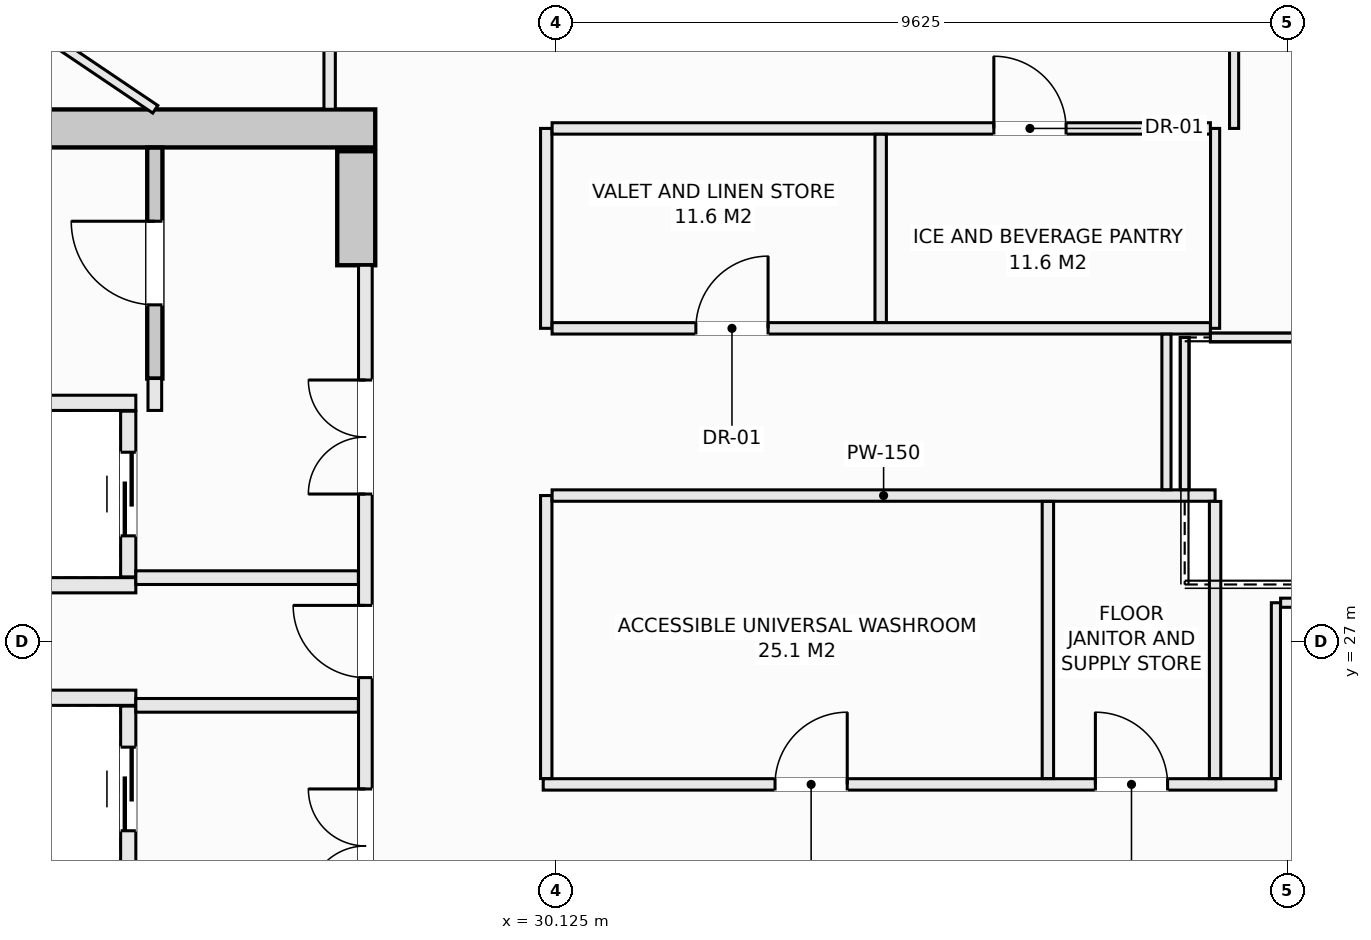
"""IFC4 building model, lengths in metres.
Left out: names, types, materials, properties, quantities, classifications, styles, units other than length and angle.
Written with IfcOpenShell. Run it as: python <this file> out.ifc"""

import sys

from ifc_helpers import new_model, si_unit, direction, frame, frame_2d, origin, place, context, subcontext, project, spatial, rectangle, extrude, element, fill, save


model = new_model("IFC4")
c1 = context("Model", 3, precision=1e-05, world=origin(), true_north=direction((0.0, 1.0)))
c2 = subcontext(c1, "Body", "Model", "MODEL_VIEW")
j1 = project(units=[si_unit("LENGTHUNIT", "METRE"), si_unit("PLANEANGLEUNIT", "RADIAN")], contexts=[c1])
p1 = place(None, origin())
s1 = spatial("IfcSite", under=j1, at=p1, CompositionType="ELEMENT")
p2 = place(p1, origin())
s2 = spatial("IfcBuilding", under=s1, at=p2, CompositionType="ELEMENT")
p3 = place(p2, frame((0.0, 0.0, 199.7)))
s3 = spatial("IfcBuildingStorey", under=s2, at=p3, CompositionType="ELEMENT", Elevation=199.7)
p4 = place(p3, frame((14.25, 33.75, -0.27), z_axis=(0.0, 0.0, 1.0), x_axis=(1.0, 0.0, 0.0)))
e1 = element("IfcWall", 1, at=p4, inside=s3, PredefinedType="SHEAR", context=c2, shape_type="SweptSolid", body=[
    extrude(rectangle(XDim=13.5, YDim=0.5, at=frame_2d((6.75, 0.0))), origin(), (0.0, 0.0, 1.0), 3.3),
])
p5 = place(p3, frame((27.5, 31.95, -0.27), z_axis=(0.0, 0.0, 1.0), x_axis=(0.0, 1.0, 0.0)))
e2 = element("IfcWall", 2, at=p5, inside=s3, PredefinedType="SHEAR", context=c2, shape_type="SweptSolid", body=[
    extrude(rectangle(XDim=1.5, YDim=0.5, at=frame_2d((0.75, 0.0))), origin(), (0.0, 0.0, 1.0), 3.3),
])
p6 = place(p3, frame((24.85, 30.46, -0.27), z_axis=(0.0, 0.0, 1.0), x_axis=(0.0, 1.0, 0.0)))
e3 = element("IfcWall", 3, at=p6, inside=s3, PredefinedType="SHEAR", context=c2, shape_type="SweptSolid", body=[
    extrude(rectangle(XDim=3.038, YDim=0.2, at=frame_2d((1.519, 0.0))), origin(), (0.0, 0.0, 1.0), 3.3),
])
p7 = place(p6, frame((0.969, 0.0, 0.27)))
e4 = element("IfcOpeningElement", 4, at=p7, cuts=e3, PredefinedType="OPENING", context=c2, shape_type="SweptSolid", body=[
    extrude(rectangle(XDim=1.1, YDim=2.15, at=frame_2d((0.55, 1.075))), frame((0.0, 0.11, 0.0), z_axis=(0.0, -1.0, 0.0), x_axis=(1.0, 0.0, 0.0)), (0.0, 0.0, 1.0), 0.22),
])
for number, where, z_axis, x_axis in (
    (5, (22.15, 30.14, 0.0), (0.0, 0.0, 1.0), (1.0, 0.0, 0.0)),
    (6, (22.15, 27.74, 0.0), (0.0, 0.0, 1.0), (1.0, 0.0, 0.0)),
):
    element("IfcWall", number, at=place(p3, frame(where, z_axis=z_axis, x_axis=x_axis)), inside=s3, PredefinedType="SOLIDWALL", context=c2, shape_type="SweptSolid", body=[
        extrude(rectangle(XDim=2.45, YDim=0.2, at=frame_2d((1.225, 0.0))), origin(), (0.0, 0.0, 1.0), 3.03),
    ])
p8 = place(p3, frame((24.5, 27.85, 0.0), z_axis=(0.0, 0.0, 1.0), x_axis=(0.0, 1.0, 0.0)))
e7 = element("IfcWall", 7, at=p8, inside=s3, PredefinedType="SOLIDWALL", context=c2, shape_type="SweptSolid", body=[
    extrude(rectangle(XDim=2.18, YDim=0.2, at=frame_2d((1.09, 0.0))), origin(), (0.0, 0.0, 1.0), 3.03),
])
p9 = place(p8, frame((0.54, 0.0, 0.0)))
e8 = element("IfcOpeningElement", 8, at=p9, cuts=e7, PredefinedType="OPENING", context=c2, shape_type="SweptSolid", body=[
    extrude(rectangle(XDim=1.1, YDim=2.2, at=frame_2d((0.55, 1.1))), frame((0.0, 0.11, 0.0), z_axis=(0.0, -1.0, 0.0), x_axis=(1.0, 0.0, 0.0)), (0.0, 0.0, 1.0), 0.22),
])
p10 = place(p3, frame((22.15, 26.26, 0.0), z_axis=(0.0, 0.0, 1.0), x_axis=(1.0, 0.0, 0.0)))
e9 = element("IfcWall", 9, at=p10, inside=s3, PredefinedType="SOLIDWALL", context=c2, shape_type="SweptSolid", body=[
    extrude(rectangle(XDim=2.45, YDim=0.2, at=frame_2d((1.225, 0.0))), origin(), (0.0, 0.0, 1.0), 3.03),
])
p11 = place(p3, frame((24.5, 23.97, 0.0), z_axis=(0.0, 0.0, 1.0), x_axis=(0.0, 1.0, 0.0)))
e10 = element("IfcWall", 10, at=p11, inside=s3, PredefinedType="SOLIDWALL", context=c2, shape_type="SweptSolid", body=[
    extrude(rectangle(XDim=2.18, YDim=0.2, at=frame_2d((1.09, 0.0))), origin(), (0.0, 0.0, 1.0), 3.03),
])
p12 = place(p11, frame((0.54, 0.0, 0.0)))
e11 = element("IfcOpeningElement", 11, at=p12, cuts=e10, PredefinedType="OPENING", context=c2, shape_type="SweptSolid", body=[
    extrude(rectangle(XDim=1.1, YDim=2.2, at=frame_2d((0.55, 1.1))), frame((0.0, 0.11, 0.0), z_axis=(0.0, -1.0, 0.0), x_axis=(1.0, 0.0, 0.0)), (0.0, 0.0, 1.0), 0.22),
])
p13 = place(p3, frame((24.85, 30.04, 0.0), z_axis=(0.0, 0.0, 1.0), x_axis=(0.0, 1.0, 0.0)))
e12 = element("IfcWall", 12, at=p13, inside=s3, PredefinedType="SOLIDWALL", context=c2, shape_type="SweptSolid", body=[
    extrude(rectangle(XDim=0.42, YDim=0.18, at=frame_2d((0.21, 0.0))), origin(), (0.0, 0.0, 1.0), 3.03),
])
p14 = place(p3, frame((27.62, 22.05, 0.0), z_axis=(0.0, 0.0, 1.0), x_axis=(0.0, 1.0, 0.0)))
e13 = element("IfcWall", 13, at=p14, inside=s3, PredefinedType="SOLIDWALL", context=c2, shape_type="SweptSolid", body=[
    extrude(rectangle(XDim=9.9, YDim=0.18, at=frame_2d((4.95, 0.0))), origin(), (0.0, 0.0, 1.0), 3.03),
])
p15 = place(p14, frame((4.475, 0.0, 0.0)))
e14 = element("IfcOpeningElement", 14, at=p15, cuts=e13, PredefinedType="OPENING", context=c2, shape_type="SweptSolid", body=[
    extrude(rectangle(XDim=0.95, YDim=2.1, at=frame_2d((0.475, 1.05))), frame((0.0, 0.1, 0.0), z_axis=(0.0, -1.0, 0.0), x_axis=(1.0, 0.0, 0.0)), (0.0, 0.0, 1.0), 0.2),
])
p16 = place(p14, frame((6.89, 0.0, 0.0)))
e15 = element("IfcOpeningElement", 15, at=p16, cuts=e13, PredefinedType="OPENING", context=c2, shape_type="SweptSolid", body=[
    extrude(rectangle(XDim=1.5, YDim=2.2, at=frame_2d((0.75, 1.1))), frame((0.0, 0.1, 0.0), z_axis=(0.0, -1.0, 0.0), x_axis=(1.0, 0.0, 0.0)), (0.0, 0.0, 1.0), 0.2),
])
p17 = place(p14, frame((1.51, 0.0, 0.0)))
e16 = element("IfcOpeningElement", 16, at=p17, cuts=e13, PredefinedType="OPENING", context=c2, shape_type="SweptSolid", body=[
    extrude(rectangle(XDim=1.5, YDim=2.2, at=frame_2d((0.75, 1.1))), frame((0.0, 0.1, 0.0), z_axis=(0.0, -1.0, 0.0), x_axis=(1.0, 0.0, 0.0)), (0.0, 0.0, 1.0), 0.2),
])
for number, where, z_axis, x_axis in (
    (17, (24.6, 27.84, 0.0), (0.0, 0.0, 1.0), (1.0, 0.0, 0.0)),
    (18, (24.6, 26.16, 0.0), (0.0, 0.0, 1.0), (1.0, 0.0, 0.0)),
):
    element("IfcWall", number, at=place(p3, frame(where, z_axis=z_axis, x_axis=x_axis)), inside=s3, PredefinedType="SOLIDWALL", context=c2, shape_type="SweptSolid", body=[
        extrude(rectangle(XDim=2.928, YDim=0.18, at=frame_2d((1.464, 0.0))), origin(), (0.0, 0.0, 1.0), 3.03),
    ])
p18 = place(p3, frame((27.15, 34.002, 0.0), z_axis=(0.0, 0.0, 1.0), x_axis=(0.0, 1.0, 0.0)))
e19 = element("IfcWall", 19, at=p18, inside=s3, PredefinedType="PARTITIONING", context=c2, shape_type="SweptSolid", body=[
    extrude(rectangle(XDim=4.198, YDim=0.15, at=frame_2d((2.099, 0.0))), origin(), (0.0, 0.0, 1.0), 3.03),
])
p19 = place(p18, frame((1.998, 0.0, 0.0)))
e20 = element("IfcOpeningElement", 20, at=p19, cuts=e19, PredefinedType="OPENING", context=c2, shape_type="SweptSolid", body=[
    extrude(rectangle(XDim=0.95, YDim=2.1, at=frame_2d((0.475, 1.05))), frame((0.0, 0.085, 0.0), z_axis=(0.0, -1.0, 0.0), x_axis=(1.0, 0.0, 0.0)), (0.0, 0.0, 1.0), 0.17),
])
p20 = place(p3, frame((29.96, 25.12, 0.0), z_axis=(0.0, 0.0, 1.0), x_axis=(1.0, 0.0, 0.0)))
e21 = element("IfcWall", 21, at=p20, inside=s3, PredefinedType="PARTITIONING", context=c2, shape_type="SweptSolid", body=[
    extrude(rectangle(XDim=9.64, YDim=0.15, at=frame_2d((4.82, 0.0))), origin(), (0.0, 0.0, 1.0), 3.03),
])
p21 = place(p20, frame((3.05, 0.0, 0.0)))
e22 = element("IfcOpeningElement", 22, at=p21, cuts=e21, PredefinedType="OPENING", context=c2, shape_type="SweptSolid", body=[
    extrude(rectangle(XDim=0.95, YDim=2.1, at=frame_2d((0.475, 1.05))), frame((0.0, 0.085, 0.0), z_axis=(0.0, -1.0, 0.0), x_axis=(1.0, 0.0, 0.0)), (0.0, 0.0, 1.0), 0.17),
])
p22 = place(p20, frame((7.265, 0.0, 0.0)))
e23 = element("IfcOpeningElement", 23, at=p22, cuts=e21, PredefinedType="OPENING", context=c2, shape_type="SweptSolid", body=[
    extrude(rectangle(XDim=0.95, YDim=2.1, at=frame_2d((0.475, 1.05))), frame((0.0, 0.085, 0.0), z_axis=(0.0, -1.0, 0.0), x_axis=(1.0, 0.0, 0.0)), (0.0, 0.0, 1.0), 0.17),
])
p23 = place(p3, frame((30.0, 25.197, 0.0), z_axis=(0.0, 0.0, 1.0), x_axis=(0.0, 1.0, 0.0)))
e24 = element("IfcWall", 24, at=p23, inside=s3, PredefinedType="PARTITIONING", context=c2, shape_type="SweptSolid", body=[
    extrude(rectangle(XDim=3.723, YDim=0.15, at=frame_2d((1.861, 0.0))), origin(), (0.0, 0.0, 1.0), 3.03),
])
p24 = place(p3, frame((30.0, 31.12, 0.0), z_axis=(0.0, 0.0, 1.0), x_axis=(0.0, 1.0, 0.0)))
e25 = element("IfcWall", 25, at=p24, inside=s3, PredefinedType="PARTITIONING", context=c2, shape_type="SweptSolid", body=[
    extrude(rectangle(XDim=2.63, YDim=0.15, at=frame_2d((1.315, 0.0))), origin(), (0.0, 0.0, 1.0), 3.03),
])
p25 = place(p3, frame((30.077, 28.92, 0.0), z_axis=(0.0, 0.0, 1.0), x_axis=(1.0, 0.0, 0.0)))
e26 = element("IfcWall", 26, at=p25, inside=s3, PredefinedType="PARTITIONING", context=c2, shape_type="SweptSolid", body=[
    extrude(rectangle(XDim=8.723, YDim=0.15, at=frame_2d((4.362, 0.0))), origin(), (0.0, 0.0, 1.0), 3.03),
])
for number, where, z_axis, x_axis in (
    (27, (36.6, 25.197, 0.0), (0.0, 0.0, 1.0), (0.0, 1.0, 0.0)),
    (28, (38.8, 25.197, 0.0), (0.0, 0.0, 1.0), (0.0, 1.0, 0.0)),
):
    element("IfcWall", number, at=place(p3, frame(where, z_axis=z_axis, x_axis=x_axis)), inside=s3, PredefinedType="PARTITIONING", context=c2, shape_type="SweptSolid", body=[
        extrude(rectangle(XDim=3.646, YDim=0.15, at=frame_2d((1.823, 0.0))), origin(), (0.0, 0.0, 1.0), 3.03),
    ])
p26 = place(p3, frame((38.8, 31.12, 0.0), z_axis=(0.0, 0.0, 1.0), x_axis=(0.0, 1.0, 0.0)))
e29 = element("IfcWall", 29, at=p26, inside=s3, PredefinedType="PARTITIONING", context=c2, shape_type="SweptSolid", body=[
    extrude(rectangle(XDim=2.63, YDim=0.12, at=frame_2d((1.315, 0.0))), origin(), (0.0, 0.0, 1.0), 3.03),
])
p27 = place(p3, frame((30.077, 31.12, 0.0), z_axis=(0.0, 0.0, 1.0), x_axis=(1.0, 0.0, 0.0)))
e30 = element("IfcWall", 30, at=p27, inside=s3, PredefinedType="PARTITIONING", context=c2, shape_type="SweptSolid", body=[
    extrude(rectangle(XDim=8.661, YDim=0.15, at=frame_2d((4.331, 0.0))), origin(), (0.0, 0.0, 1.0), 3.03),
])
p28 = place(p27, frame((1.892, 0.0, 0.0)))
e31 = element("IfcOpeningElement", 31, at=p28, cuts=e30, PredefinedType="OPENING", context=c2, shape_type="SweptSolid", body=[
    extrude(rectangle(XDim=0.95, YDim=2.1, at=frame_2d((0.475, 1.05))), frame((0.0, 0.085, 0.0), z_axis=(0.0, -1.0, 0.0), x_axis=(1.0, 0.0, 0.0)), (0.0, 0.0, 1.0), 0.17),
])
p29 = place(p3, frame((30.077, 33.75, 0.0), z_axis=(0.0, 0.0, 1.0), x_axis=(1.0, 0.0, 0.0)))
e32 = element("IfcWall", 32, at=p29, inside=s3, PredefinedType="PARTITIONING", context=c2, shape_type="SweptSolid", body=[
    extrude(rectangle(XDim=8.661, YDim=0.15, at=frame_2d((4.331, 0.0))), origin(), (0.0, 0.0, 1.0), 3.03),
])
p30 = place(p29, frame((5.812, 0.0, 0.0)))
e33 = element("IfcOpeningElement", 33, at=p30, cuts=e32, PredefinedType="OPENING", context=c2, shape_type="SweptSolid", body=[
    extrude(rectangle(XDim=0.95, YDim=2.1, at=frame_2d((0.475, 1.05))), frame((0.0, 0.085, 0.0), z_axis=(0.0, -1.0, 0.0), x_axis=(1.0, 0.0, 0.0)), (0.0, 0.0, 1.0), 0.17),
])
p31 = place(p3, frame((34.4, 31.197, 0.0), z_axis=(0.0, 0.0, 1.0), x_axis=(0.0, 1.0, 0.0)))
e34 = element("IfcWall", 34, at=p31, inside=s3, PredefinedType="PARTITIONING", context=c2, shape_type="SweptSolid", body=[
    extrude(rectangle(XDim=2.476, YDim=0.15, at=frame_2d((1.238, 0.0))), origin(), (0.0, 0.0, 1.0), 3.03),
])
p32 = place(p3, frame((39.05, 33.75, 0.0), z_axis=(0.0, 0.0, 1.0), x_axis=(0.0, 1.0, 0.0)))
e35 = element("IfcWall", 35, at=p32, inside=s3, PredefinedType="PARTITIONING", context=c2, shape_type="SweptSolid", body=[
    extrude(rectangle(XDim=1.938, YDim=0.12, at=frame_2d((0.969, 0.0))), origin(), (0.0, 0.0, 1.0), 3.03),
])
p33 = place(p3, frame((38.16, 28.997, 0.0), z_axis=(0.0, 0.0, 1.0), x_axis=(0.0, 1.0, 0.0)))
e36 = element("IfcWall", 36, at=p33, inside=s3, PredefinedType="PARTITIONING", context=c2, shape_type="SweptSolid", body=[
    extrude(rectangle(XDim=2.046, YDim=0.12, at=frame_2d((1.023, 0.0))), origin(), (0.0, 0.0, 1.0), 3.03),
])
p34 = place(p3, frame((39.6, 25.197, 0.0), z_axis=(0.0, 0.0, 1.0), x_axis=(0.0, 1.0, 0.0)))
e37 = element("IfcWall", 37, at=p34, inside=s3, PredefinedType="PARTITIONING", context=c2, shape_type="SweptSolid", body=[
    extrude(rectangle(XDim=2.313, YDim=0.12, at=frame_2d((1.156, 0.0))), origin(), (0.0, 0.0, 1.0), 3.03),
])
p35 = place(p3, frame((39.662, 27.51, 0.0), z_axis=(0.0, 0.0, 1.0), x_axis=(1.0, 0.0, 0.0)))
e38 = element("IfcWall", 38, at=p35, inside=s3, PredefinedType="PARTITIONING", context=c2, shape_type="SweptSolid", body=[
    extrude(rectangle(XDim=1.858, YDim=0.12, at=frame_2d((0.929, 0.0))), origin(), (0.0, 0.0, 1.0), 3.03),
])
p36 = place(p3, frame((38.738, 31.0, 0.0), z_axis=(0.0, 0.0, 1.0), x_axis=(1.0, 0.0, 0.0)))
e39 = element("IfcWall", 39, at=p36, inside=s3, PredefinedType="PARTITIONING", context=c2, shape_type="SweptSolid", body=[
    extrude(rectangle(XDim=5.3, YDim=0.12, at=frame_2d((2.65, 0.0))), origin(), (0.0, 0.0, 1.0), 3.03),
])
p37 = place(p3, frame((38.4, 28.997, 0.0), z_axis=(0.0, 0.0, 1.0), x_axis=(0.0, 1.0, 0.0)))
e40 = element("IfcWall", 40, at=p37, inside=s3, PredefinedType="PARTITIONING", context=c2, shape_type="SweptSolid", body=[
    extrude(rectangle(XDim=2.003, YDim=0.12, at=frame_2d((1.001, 0.0))), origin(), (0.0, 0.0, 1.0), 3.03),
])
p38 = place(p3, frame((23.253, 35.083, 0.0), z_axis=(0.0, 0.0, 1.0), x_axis=(0.8290462611, -0.559180021957, 0.0)))
e41 = element("IfcWall", 41, at=p38, inside=s3, PredefinedType="PARTITIONING", context=c2, shape_type="SweptSolid", body=[
    extrude(rectangle(XDim=1.933, YDim=0.12, at=frame_2d((0.967, 0.0))), origin(), (0.0, 0.0, 1.0), 3.03),
])
p39 = place(p7, origin())
e42 = element("IfcDoor", 42, at=p39, inside=s3, OperationType="SINGLE_SWING_RIGHT", PredefinedType="DOOR", context=c2, shape_type="SweptSolid", body=[
    extrude(rectangle(XDim=1.1, YDim=2.15, at=frame_2d((0.55, 1.075))), frame((0.0, 0.025, 0.0), z_axis=(0.0, -1.0, 0.0), x_axis=(1.0, 0.0, 0.0)), (0.0, 0.0, 1.0), 0.05),
])
fill(e4, e42)
p40 = place(p9, origin())
e43 = element("IfcDoor", 43, at=p40, inside=s3, OperationType="SLIDING_TO_LEFT", PredefinedType="DOOR", context=c2, shape_type="SweptSolid", body=[
    extrude(rectangle(XDim=1.1, YDim=2.2, at=frame_2d((0.55, 1.1))), frame((0.0, 0.025, 0.0), z_axis=(0.0, -1.0, 0.0), x_axis=(1.0, 0.0, 0.0)), (0.0, 0.0, 1.0), 0.05),
])
fill(e8, e43)
p41 = place(p12, origin())
e44 = element("IfcDoor", 44, at=p41, inside=s3, OperationType="SLIDING_TO_LEFT", PredefinedType="DOOR", context=c2, shape_type="SweptSolid", body=[
    extrude(rectangle(XDim=1.1, YDim=2.2, at=frame_2d((0.55, 1.1))), frame((0.0, 0.025, 0.0), z_axis=(0.0, -1.0, 0.0), x_axis=(1.0, 0.0, 0.0)), (0.0, 0.0, 1.0), 0.05),
])
fill(e11, e44)
p42 = place(p15, origin())
e45 = element("IfcDoor", 45, at=p42, inside=s3, OperationType="SINGLE_SWING_RIGHT", PredefinedType="DOOR", context=c2, shape_type="SweptSolid", body=[
    extrude(rectangle(XDim=0.95, YDim=2.1, at=frame_2d((0.475, 1.05))), frame((0.0, 0.025, 0.0), z_axis=(0.0, -1.0, 0.0), x_axis=(1.0, 0.0, 0.0)), (0.0, 0.0, 1.0), 0.05),
])
fill(e14, e45)
p43 = place(p16, origin())
e46 = element("IfcDoor", 46, at=p43, inside=s3, OperationType="DOUBLE_DOOR_SINGLE_SWING", PredefinedType="DOOR", context=c2, shape_type="SweptSolid", body=[
    extrude(rectangle(XDim=1.5, YDim=2.2, at=frame_2d((0.75, 1.1))), frame((0.0, 0.025, 0.0), z_axis=(0.0, -1.0, 0.0), x_axis=(1.0, 0.0, 0.0)), (0.0, 0.0, 1.0), 0.05),
])
fill(e15, e46)
p44 = place(p17, origin())
e47 = element("IfcDoor", 47, at=p44, inside=s3, OperationType="DOUBLE_DOOR_SINGLE_SWING", PredefinedType="DOOR", context=c2, shape_type="SweptSolid", body=[
    extrude(rectangle(XDim=1.5, YDim=2.2, at=frame_2d((0.75, 1.1))), frame((0.0, 0.025, 0.0), z_axis=(0.0, -1.0, 0.0), x_axis=(1.0, 0.0, 0.0)), (0.0, 0.0, 1.0), 0.05),
])
fill(e16, e47)
p45 = place(p21, origin())
e48 = element("IfcDoor", 48, at=p45, inside=s3, OperationType="SINGLE_SWING_RIGHT", PredefinedType="DOOR", context=c2, shape_type="SweptSolid", body=[
    extrude(rectangle(XDim=0.95, YDim=2.1, at=frame_2d((0.475, 1.05))), frame((0.0, 0.025, 0.0), z_axis=(0.0, -1.0, 0.0), x_axis=(1.0, 0.0, 0.0)), (0.0, 0.0, 1.0), 0.05),
])
fill(e22, e48)
p46 = place(p22, origin())
e49 = element("IfcDoor", 49, at=p46, inside=s3, OperationType="SINGLE_SWING_LEFT", PredefinedType="DOOR", context=c2, shape_type="SweptSolid", body=[
    extrude(rectangle(XDim=0.95, YDim=2.1, at=frame_2d((0.475, 1.05))), frame((0.0, 0.025, 0.0), z_axis=(0.0, -1.0, 0.0), x_axis=(1.0, 0.0, 0.0)), (0.0, 0.0, 1.0), 0.05),
])
fill(e23, e49)
p47 = place(p28, origin())
e50 = element("IfcDoor", 50, at=p47, inside=s3, OperationType="SINGLE_SWING_RIGHT", PredefinedType="DOOR", context=c2, shape_type="SweptSolid", body=[
    extrude(rectangle(XDim=0.95, YDim=2.1, at=frame_2d((0.475, 1.05))), frame((0.0, 0.025, 0.0), z_axis=(0.0, -1.0, 0.0), x_axis=(1.0, 0.0, 0.0)), (0.0, 0.0, 1.0), 0.05),
])
fill(e31, e50)
p48 = place(p30, origin())
e51 = element("IfcDoor", 51, at=p48, inside=s3, OperationType="SINGLE_SWING_LEFT", PredefinedType="DOOR", context=c2, shape_type="SweptSolid", body=[
    extrude(rectangle(XDim=0.95, YDim=2.1, at=frame_2d((0.475, 1.05))), frame((0.0, 0.025, 0.0), z_axis=(0.0, -1.0, 0.0), x_axis=(1.0, 0.0, 0.0)), (0.0, 0.0, 1.0), 0.05),
])
fill(e33, e51)
save(model, sys.argv[1])
